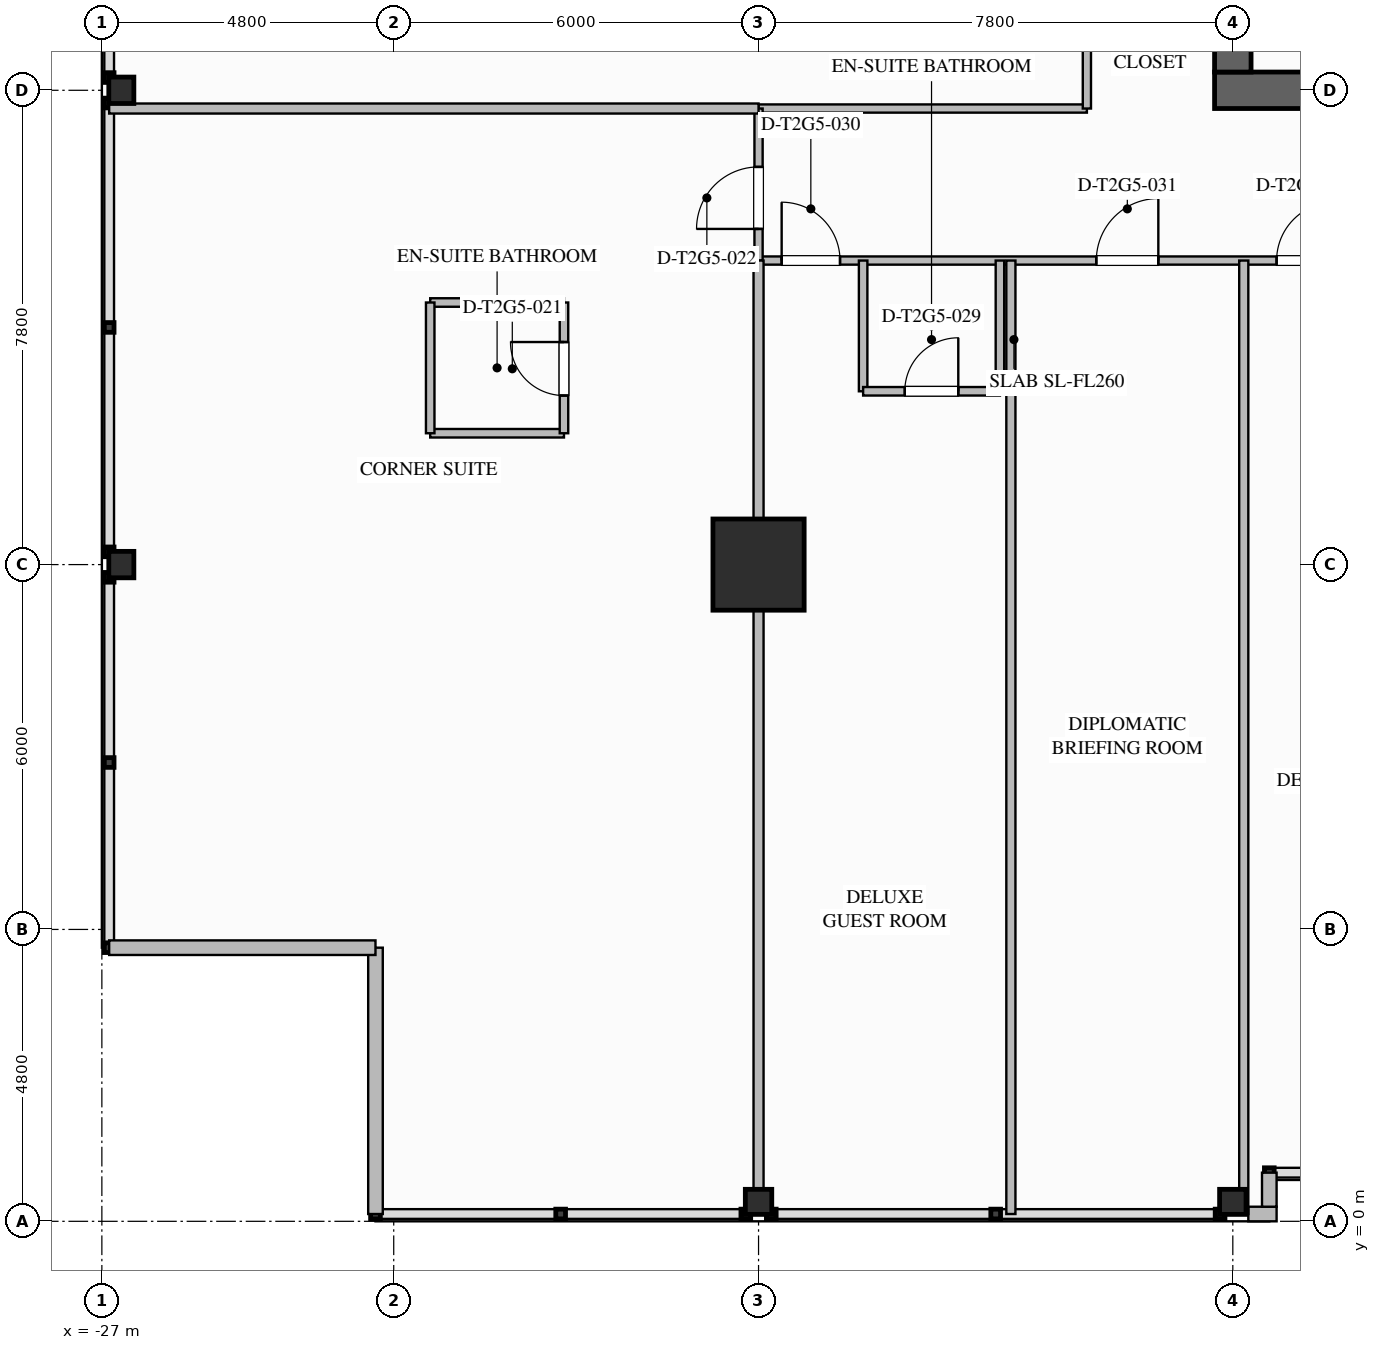
"""IFC4 building model, lengths in metres.
Left out: names, types, materials, properties, quantities, classifications, styles, units other than length and angle.
Written with IfcOpenShell. Run it as: python <this file> out.ifc"""

import sys

from ifc_helpers import new_model, si_unit, direction, frame, frame_2d, origin, origin_2d, place, context, subcontext, project, spatial, rectangle, i_section, extrude, element, fill, save


model = new_model("IFC4")
c1 = context("Model", 3, precision=1e-05, world=origin(), true_north=direction((0.0, 1.0)))
c2 = subcontext(c1, "Body", "Model", "MODEL_VIEW")
j1 = project(units=[si_unit("LENGTHUNIT", "METRE"), si_unit("PLANEANGLEUNIT", "RADIAN")], contexts=[c1])
p1 = place(None, origin())
s1 = spatial("IfcSite", under=j1, at=p1, CompositionType="ELEMENT")
p2 = place(p1, origin())
s2 = spatial("IfcBuilding", under=s1, at=p2, CompositionType="ELEMENT")
p3 = place(p2, frame((0.0, 0.0, 133.8)))
s3 = spatial("IfcBuildingStorey", under=s2, at=p3, CompositionType="ELEMENT", Elevation=133.8)
p4 = place(p3, frame((8.7, 18.6, 0.0), z_axis=(0.0, 0.0, 1.0), x_axis=(-1.0, 0.0, 0.0)))
e1 = element("IfcWall", 1, at=p4, inside=s3, PredefinedType="SHEAR", context=c2, shape_type="SweptSolid", body=[
    extrude(rectangle(XDim=17.4, YDim=0.6, at=frame_2d((8.7, 0.0))), origin(), (0.0, 0.0, 1.0), 3.5),
])
p5 = place(p3, frame((-8.4, 18.9, 0.0), z_axis=(0.0, 0.0, 1.0), x_axis=(0.0, 1.0, 0.0)))
e2 = element("IfcWall", 2, at=p5, inside=s3, PredefinedType="SHEAR", context=c2, shape_type="SweptSolid", body=[
    extrude(rectangle(XDim=16.2, YDim=0.6, at=frame_2d((8.1, 0.0))), origin(), (0.0, 0.0, 1.0), 3.5),
])
p6 = place(p5, frame((4.5, 0.0, 0.0)))
e3 = element("IfcOpeningElement", 3, at=p6, cuts=e2, PredefinedType="OPENING", context=c2, shape_type="SweptSolid", body=[
    extrude(rectangle(XDim=1.08, YDim=2.04, at=frame_2d((0.54, 1.02))), frame((0.0, 0.31, 0.0), z_axis=(0.0, -1.0, 0.0), x_axis=(1.0, 0.0, 0.0)), (0.0, 0.0, 1.0), 0.62),
])
p7 = place(p3, frame((-16.2, 10.8, 0.0), z_axis=(0.0, 0.0, 1.0), x_axis=(1.0, 0.0, 0.0)))
e4 = element("IfcColumn", 4, at=p7, inside=s3, PredefinedType="COLUMN", context=c2, shape_type="SweptSolid", body=[
    extrude(rectangle(XDim=1.5, YDim=1.5, at=origin_2d()), origin(), (0.0, 0.0, 1.0), 3.5),
])
for number, where, z_axis, x_axis in (
    (5, (-26.68, 10.8, 0.0), (0.0, 0.0, 1.0), (1.0, 0.0, 0.0)),
    (6, (-26.68, 18.6, 0.0), (0.0, 0.0, 1.0), (1.0, 0.0, 0.0)),
    (7, (-16.2, 0.32, 0.0), (0.0, 0.0, 1.0), (0.0, 1.0, 0.0)),
    (8, (-8.4, 0.32, 0.0), (0.0, 0.0, 1.0), (0.0, 1.0, 0.0)),
):
    element("IfcColumn", number, at=place(p3, frame(where, z_axis=z_axis, x_axis=x_axis)), inside=s3, PredefinedType="COLUMN", context=c2, shape_type="SweptSolid", body=[
        extrude(i_section(OverallWidth=0.412, OverallDepth=0.435, WebThickness=0.036, FlangeThickness=0.057, FilletRadius=0.028, at=origin_2d()), origin(), (0.0, 0.0, 1.0), 3.497),
    ])
p8 = place(p3, frame((-7.68, 0.12, 0.0), z_axis=(0.0, 0.0, 1.0), x_axis=(-1.0, 0.0, 0.0)))
e9 = element("IfcWall", 9, at=p8, inside=s3, PredefinedType="STANDARD", context=c2, shape_type="SweptSolid", body=[
    extrude(rectangle(XDim=0.465, YDim=0.24, at=frame_2d((0.232, 0.0))), origin(), (0.0, 0.0, 1.0), 3.24),
])
for number, where, z_axis, x_axis in (
    (10, (-22.5, 0.12, 0.0), (0.0, 0.0, 1.0), (0.0, 1.0, 0.0)),
    (11, (-22.5, 4.5, 0.0), (0.0, 0.0, 1.0), (-1.0, 0.0, 0.0)),
):
    element("IfcWall", number, at=place(p3, frame(where, z_axis=z_axis, x_axis=x_axis)), inside=s3, PredefinedType="STANDARD", context=c2, shape_type="SweptSolid", body=[
        extrude(rectangle(XDim=4.38, YDim=0.24, at=frame_2d((2.19, 0.0))), origin(), (0.0, 0.0, 1.0), 3.24),
    ])
p9 = place(p3, frame((-7.8, 0.8, 0.0), z_axis=(0.0, 0.0, 1.0), x_axis=(0.0, -1.0, 0.0)))
e12 = element("IfcWall", 12, at=p9, inside=s3, PredefinedType="STANDARD", context=c2, shape_type="SweptSolid", body=[
    extrude(rectangle(XDim=0.56, YDim=0.24, at=frame_2d((0.28, 0.0))), origin(), (0.0, 0.0, 1.0), 3.24),
])
p10 = place(p3, frame((-16.2, 18.3, 0.0), z_axis=(0.0, 0.0, 1.0), x_axis=(1.0, 0.0, 0.0)))
e13 = element("IfcWall", 13, at=p10, inside=s3, PredefinedType="PARTITIONING", context=c2, shape_type="SweptSolid", body=[
    extrude(rectangle(XDim=5.4, YDim=0.135, at=frame_2d((2.7, 0.0))), origin(), (0.0, 0.0, 1.0), 3.24),
])
p11 = place(p3, frame((-16.2, 15.8, 0.0), z_axis=(0.0, 0.0, 1.0), x_axis=(1.0, 0.0, 0.0)))
e14 = element("IfcWall", 14, at=p11, inside=s3, PredefinedType="PARTITIONING", context=c2, shape_type="SweptSolid", body=[
    extrude(rectangle(XDim=24.9, YDim=0.135, at=frame_2d((12.45, 0.0))), origin(), (0.0, 0.0, 1.0), 3.24),
])
p12 = place(p11, frame((0.38, 0.0, 0.0)))
e15 = element("IfcOpeningElement", 15, at=p12, cuts=e14, PredefinedType="OPENING", context=c2, shape_type="SweptSolid", body=[
    extrude(rectangle(XDim=0.96, YDim=2.15, at=frame_2d((0.48, 1.075))), frame((0.0, 0.077, 0.0), z_axis=(0.0, -1.0, 0.0), x_axis=(1.0, 0.0, 0.0)), (0.0, 0.0, 1.0), 0.155),
])
p13 = place(p11, frame((5.555, 0.0, 0.0)))
e16 = element("IfcOpeningElement", 16, at=p13, cuts=e14, PredefinedType="OPENING", context=c2, shape_type="SweptSolid", body=[
    extrude(rectangle(XDim=1.02, YDim=2.15, at=frame_2d((0.51, 1.075))), frame((0.0, 0.077, 0.0), z_axis=(0.0, -1.0, 0.0), x_axis=(1.0, 0.0, 0.0)), (0.0, 0.0, 1.0), 0.155),
])
p14 = place(p11, frame((8.52, 0.0, 0.0)))
e17 = element("IfcOpeningElement", 17, at=p14, cuts=e14, PredefinedType="OPENING", context=c2, shape_type="SweptSolid", body=[
    extrude(rectangle(XDim=0.96, YDim=2.15, at=frame_2d((0.48, 1.075))), frame((0.0, 0.077, 0.0), z_axis=(0.0, -1.0, 0.0), x_axis=(1.0, 0.0, 0.0)), (0.0, 0.0, 1.0), 0.155),
])
p15 = place(p11, frame((15.448, 0.0, 0.0)))
e18 = element("IfcOpeningElement", 18, at=p15, cuts=e14, PredefinedType="OPENING", context=c2, shape_type="SweptSolid", body=[
    extrude(rectangle(XDim=0.96, YDim=2.15, at=frame_2d((0.48, 1.075))), frame((0.0, 0.077, 0.0), z_axis=(0.0, -1.0, 0.0), x_axis=(1.0, 0.0, 0.0)), (0.0, 0.0, 1.0), 0.155),
])
p16 = place(p11, frame((18.354, 0.0, 0.0)))
e19 = element("IfcOpeningElement", 19, at=p16, cuts=e14, PredefinedType="OPENING", context=c2, shape_type="SweptSolid", body=[
    extrude(rectangle(XDim=1.02, YDim=2.15, at=frame_2d((0.51, 1.075))), frame((0.0, 0.077, 0.0), z_axis=(0.0, -1.0, 0.0), x_axis=(1.0, 0.0, 0.0)), (0.0, 0.0, 1.0), 0.155),
])
p17 = place(p11, frame((23.56, 0.0, 0.0)))
e20 = element("IfcOpeningElement", 20, at=p17, cuts=e14, PredefinedType="OPENING", context=c2, shape_type="SweptSolid", body=[
    extrude(rectangle(XDim=0.96, YDim=2.15, at=frame_2d((0.48, 1.075))), frame((0.0, 0.077, 0.0), z_axis=(0.0, -1.0, 0.0), x_axis=(1.0, 0.0, 0.0)), (0.0, 0.0, 1.0), 0.155),
])
p18 = place(p3, frame((-10.8, 18.3, 0.0), z_axis=(0.0, 0.0, 1.0), x_axis=(0.0, 1.0, 0.0)))
e21 = element("IfcWall", 21, at=p18, inside=s3, PredefinedType="PARTITIONING", context=c2, shape_type="SweptSolid", body=[
    extrude(rectangle(XDim=17.4, YDim=0.135, at=frame_2d((8.7, 0.0))), origin(), (0.0, 0.0, 1.0), 3.24),
])
p19 = place(p18, frame((4.355, 0.0, 0.0)))
e22 = element("IfcOpeningElement", 22, at=p19, cuts=e21, PredefinedType="OPENING", context=c2, shape_type="SweptSolid", body=[
    extrude(rectangle(XDim=1.26, YDim=2.2, at=frame_2d((0.63, 1.1))), frame((0.0, 0.077, 0.0), z_axis=(0.0, -1.0, 0.0), x_axis=(1.0, 0.0, 0.0)), (0.0, 0.0, 1.0), 0.155),
])
p20 = place(p18, frame((10.69, 0.0, 0.0)))
e23 = element("IfcOpeningElement", 23, at=p20, cuts=e21, PredefinedType="OPENING", context=c2, shape_type="SweptSolid", body=[
    extrude(rectangle(XDim=1.02, YDim=2.15, at=frame_2d((0.51, 1.075))), frame((0.0, 0.077, 0.0), z_axis=(0.0, -1.0, 0.0), x_axis=(1.0, 0.0, 0.0)), (0.0, 0.0, 1.0), 0.155),
])
p21 = place(p3, frame((-16.2, 15.8, 0.0), z_axis=(0.0, 0.0, 1.0), x_axis=(0.0, 1.0, 0.0)))
e24 = element("IfcWall", 24, at=p21, inside=s3, PredefinedType="PARTITIONING", context=c2, shape_type="SweptSolid", body=[
    extrude(rectangle(XDim=2.5, YDim=0.135, at=frame_2d((1.25, 0.0))), origin(), (0.0, 0.0, 1.0), 2.53),
])
p22 = place(p21, frame((0.52, 0.0, 0.0)))
e25 = element("IfcOpeningElement", 25, at=p22, cuts=e24, PredefinedType="OPENING", context=c2, shape_type="SweptSolid", body=[
    extrude(rectangle(XDim=1.02, YDim=2.15, at=frame_2d((0.51, 1.075))), frame((0.0, 0.077, 0.0), z_axis=(0.0, -1.0, 0.0), x_axis=(1.0, 0.0, 0.0)), (0.0, 0.0, 1.0), 0.155),
])
p23 = place(p3, frame((-16.2, 0.12, 0.0), z_axis=(0.0, 0.0, 1.0), x_axis=(0.0, 1.0, 0.0)))
e26 = element("IfcWall", 26, at=p23, inside=s3, PredefinedType="PARTITIONING", context=c2, shape_type="SweptSolid", body=[
    extrude(rectangle(XDim=15.68, YDim=0.165, at=frame_2d((7.84, 0.0))), origin(), (0.0, 0.0, 1.0), 2.53),
])
p24 = place(p3, frame((-26.88, 18.3, 0.0), z_axis=(0.0, 0.0, 1.0), x_axis=(1.0, 0.0, 0.0)))
e27 = element("IfcWall", 27, at=p24, inside=s3, PredefinedType="PARTITIONING", context=c2, shape_type="SweptSolid", body=[
    extrude(rectangle(XDim=10.68, YDim=0.165, at=frame_2d((5.34, 0.0))), origin(), (0.0, 0.0, 1.0), 2.53),
])
for number, where, z_axis, x_axis in (
    (28, (-21.6, 12.96, 0.0), (0.0, 0.0, 1.0), (1.0, 0.0, 0.0)),
    (29, (-21.6, 15.11, 0.0), (0.0, 0.0, 1.0), (1.0, 0.0, 0.0)),
):
    element("IfcWall", number, at=place(p3, frame(where, z_axis=z_axis, x_axis=x_axis)), inside=s3, PredefinedType="PLUMBINGWALL", context=c2, shape_type="SweptSolid", body=[
        extrude(rectangle(XDim=2.2, YDim=0.14, at=frame_2d((1.1, 0.0))), origin(), (0.0, 0.0, 1.0), 3.24),
    ])
p25 = place(p3, frame((-21.6, 12.96, 0.0), z_axis=(0.0, 0.0, 1.0), x_axis=(0.0, 1.0, 0.0)))
e30 = element("IfcWall", 30, at=p25, inside=s3, PredefinedType="PLUMBINGWALL", context=c2, shape_type="SweptSolid", body=[
    extrude(rectangle(XDim=2.15, YDim=0.14, at=frame_2d((1.075, 0.0))), origin(), (0.0, 0.0, 1.0), 3.24),
])
p26 = place(p3, frame((-19.4, 12.96, 0.0), z_axis=(0.0, 0.0, 1.0), x_axis=(0.0, 1.0, 0.0)))
e31 = element("IfcWall", 31, at=p26, inside=s3, PredefinedType="PLUMBINGWALL", context=c2, shape_type="SweptSolid", body=[
    extrude(rectangle(XDim=2.15, YDim=0.14, at=frame_2d((1.075, 0.0))), origin(), (0.0, 0.0, 1.0), 3.24),
])
p27 = place(p26, frame((0.62, 0.0, 0.0)))
e32 = element("IfcOpeningElement", 32, at=p27, cuts=e31, PredefinedType="OPENING", context=c2, shape_type="SweptSolid", body=[
    extrude(rectangle(XDim=0.88, YDim=2.1, at=frame_2d((0.44, 1.05))), frame((0.0, 0.08, 0.0), z_axis=(0.0, -1.0, 0.0), x_axis=(1.0, 0.0, 0.0)), (0.0, 0.0, 1.0), 0.16),
])
p28 = place(p3, frame((-14.48, 15.8, 0.0), z_axis=(0.0, 0.0, 1.0), x_axis=(0.0, -1.0, 0.0)))
e33 = element("IfcWall", 33, at=p28, inside=s3, PredefinedType="PLUMBINGWALL", context=c2, shape_type="SweptSolid", body=[
    extrude(rectangle(XDim=2.15, YDim=0.14, at=frame_2d((1.075, 0.0))), origin(), (0.0, 0.0, 1.0), 3.24),
])
p29 = place(p3, frame((-12.23, 15.8, 0.0), z_axis=(0.0, 0.0, 1.0), x_axis=(0.0, -1.0, 0.0)))
e34 = element("IfcWall", 34, at=p29, inside=s3, PredefinedType="PLUMBINGWALL", context=c2, shape_type="SweptSolid", body=[
    extrude(rectangle(XDim=2.15, YDim=0.14, at=frame_2d((1.075, 0.0))), origin(), (0.0, 0.0, 1.0), 2.765),
])
p30 = place(p3, frame((-14.48, 13.65, 0.0), z_axis=(0.0, 0.0, 1.0), x_axis=(1.0, 0.0, 0.0)))
e35 = element("IfcWall", 35, at=p30, inside=s3, PredefinedType="PLUMBINGWALL", context=c2, shape_type="SweptSolid", body=[
    extrude(rectangle(XDim=2.25, YDim=0.14, at=frame_2d((1.125, 0.0))), origin(), (0.0, 0.0, 1.0), 3.24),
])
p31 = place(p30, frame((0.685, 0.0, 0.0)))
e36 = element("IfcOpeningElement", 36, at=p31, cuts=e35, PredefinedType="OPENING", context=c2, shape_type="SweptSolid", body=[
    extrude(rectangle(XDim=0.88, YDim=2.1, at=frame_2d((0.44, 1.05))), frame((0.0, 0.08, 0.0), z_axis=(0.0, -1.0, 0.0), x_axis=(1.0, 0.0, 0.0)), (0.0, 0.0, 1.0), 0.16),
])
p32 = place(p3, frame((-12.05, 0.12, 0.0), z_axis=(0.0, 0.0, 1.0), x_axis=(0.0, 1.0, 0.0)))
e37 = element("IfcWall", 37, at=p32, inside=s3, PredefinedType="PARTITIONING", context=c2, shape_type="SweptSolid", body=[
    extrude(rectangle(XDim=15.68, YDim=0.15, at=frame_2d((7.84, 0.0))), origin(), (0.0, 0.0, 1.0), 2.765),
])
p33 = place(p3, frame((-8.22, 0.12, 0.0), z_axis=(0.0, 0.0, 1.0), x_axis=(0.0, 1.0, 0.0)))
e38 = element("IfcWall", 38, at=p33, inside=s3, PredefinedType="PARTITIONING", context=c2, shape_type="SweptSolid", body=[
    extrude(rectangle(XDim=15.68, YDim=0.15, at=frame_2d((7.84, 0.0))), origin(), (0.0, 0.0, 1.0), 2.53),
])
p34 = place(p27, origin())
e39 = element("IfcDoor", 39, at=p34, inside=s3, OperationType="SINGLE_SWING_RIGHT", PredefinedType="DOOR", context=c2, shape_type="SweptSolid", body=[
    extrude(rectangle(XDim=0.88, YDim=2.1, at=frame_2d((0.44, 1.05))), frame((0.0, 0.025, 0.0), z_axis=(0.0, -1.0, 0.0), x_axis=(1.0, 0.0, 0.0)), (0.0, 0.0, 1.0), 0.05),
])
fill(e32, e39)
p35 = place(p22, origin())
e40 = element("IfcDoor", 40, at=p35, inside=s3, OperationType="SINGLE_SWING_LEFT", PredefinedType="DOOR", context=c2, shape_type="SweptSolid", body=[
    extrude(rectangle(XDim=1.02, YDim=2.15, at=frame_2d((0.51, 1.075))), frame((0.0, 0.025, 0.0), z_axis=(0.0, -1.0, 0.0), x_axis=(1.0, 0.0, 0.0)), (0.0, 0.0, 1.0), 0.05),
])
fill(e25, e40)
p36 = place(p31, origin())
e41 = element("IfcDoor", 41, at=p36, inside=s3, OperationType="SINGLE_SWING_RIGHT", PredefinedType="DOOR", context=c2, shape_type="SweptSolid", body=[
    extrude(rectangle(XDim=0.88, YDim=2.1, at=frame_2d((0.44, 1.05))), frame((0.0, 0.025, 0.0), z_axis=(0.0, -1.0, 0.0), x_axis=(1.0, 0.0, 0.0)), (0.0, 0.0, 1.0), 0.05),
])
fill(e36, e41)
p37 = place(p12, origin())
e42 = element("IfcDoor", 42, at=p37, inside=s3, OperationType="SINGLE_SWING_LEFT", PredefinedType="DOOR", context=c2, shape_type="SweptSolid", body=[
    extrude(rectangle(XDim=0.96, YDim=2.15, at=frame_2d((0.48, 1.075))), frame((0.0, 0.025, 0.0), z_axis=(0.0, -1.0, 0.0), x_axis=(1.0, 0.0, 0.0)), (0.0, 0.0, 1.0), 0.05),
])
fill(e15, e42)
p38 = place(p13, origin())
e43 = element("IfcDoor", 43, at=p38, inside=s3, OperationType="SINGLE_SWING_RIGHT", PredefinedType="DOOR", context=c2, shape_type="SweptSolid", body=[
    extrude(rectangle(XDim=1.02, YDim=2.15, at=frame_2d((0.51, 1.075))), frame((0.0, 0.025, 0.0), z_axis=(0.0, -1.0, 0.0), x_axis=(1.0, 0.0, 0.0)), (0.0, 0.0, 1.0), 0.05),
])
fill(e16, e43)
p39 = place(p14, origin())
e44 = element("IfcDoor", 44, at=p39, inside=s3, OperationType="SINGLE_SWING_RIGHT", PredefinedType="DOOR", context=c2, shape_type="SweptSolid", body=[
    extrude(rectangle(XDim=0.96, YDim=2.15, at=frame_2d((0.48, 1.075))), frame((0.0, 0.025, 0.0), z_axis=(0.0, -1.0, 0.0), x_axis=(1.0, 0.0, 0.0)), (0.0, 0.0, 1.0), 0.05),
])
fill(e17, e44)
save(model, sys.argv[1])
